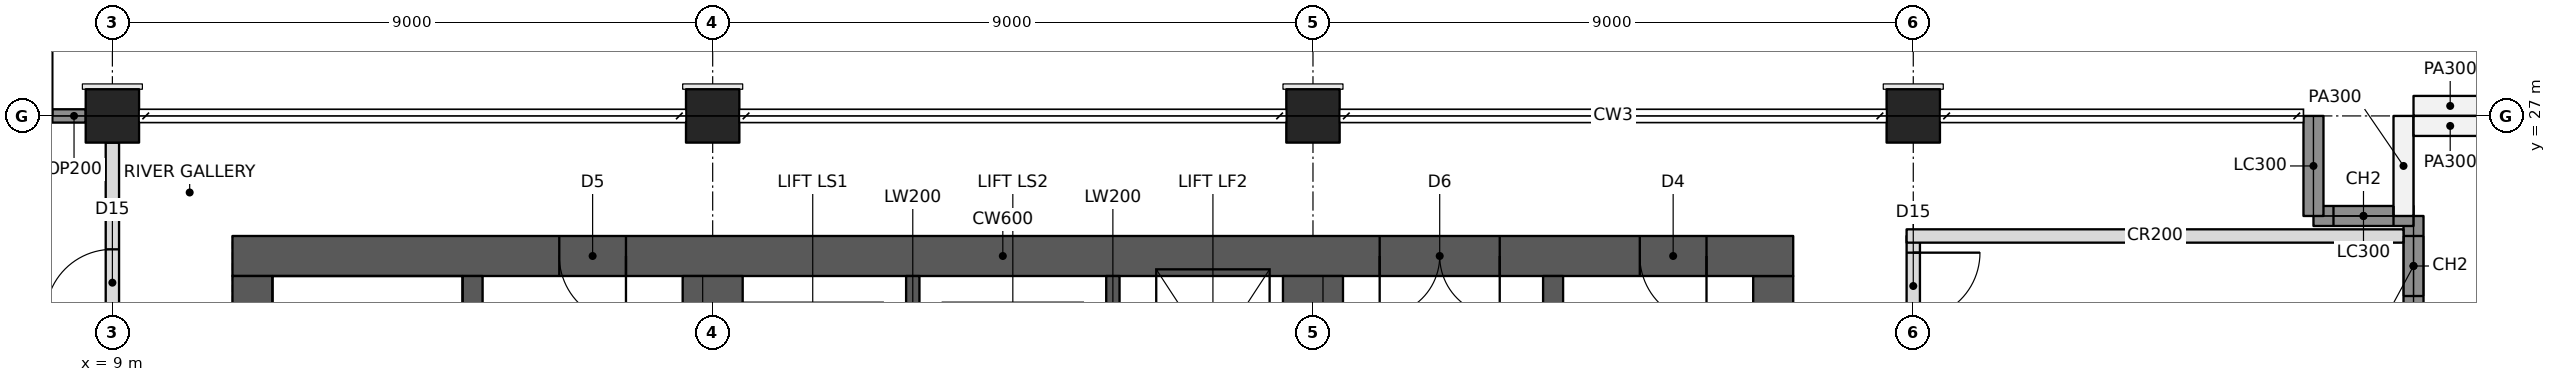
"""IFC4 building model, lengths in metres.
Left out: names, types, materials, properties, quantities, classifications, styles, units other than length and angle.
Written with IfcOpenShell. Run it as: python <this file> out.ifc"""

import sys

from ifc_helpers import new_model, si_unit, direction, frame, frame_2d, origin, origin_2d, place, context, subcontext, project, spatial, rectangle, hollow_rectangle, extrude, element, fill, save


model = new_model("IFC4")
c1 = context("Model", 3, precision=1e-05, world=origin(), true_north=direction((0.0, 1.0)))
c2 = subcontext(c1, "Body", "Model", "MODEL_VIEW")
j1 = project(units=[si_unit("LENGTHUNIT", "METRE"), si_unit("PLANEANGLEUNIT", "RADIAN")], contexts=[c1])
p1 = place(None, origin())
s1 = spatial("IfcSite", under=j1, at=p1, CompositionType="ELEMENT")
p2 = place(p1, origin())
s2 = spatial("IfcBuilding", under=s1, at=p2, CompositionType="ELEMENT")
p3 = place(p2, frame((0.0, 0.0, 160.4)))
s3 = spatial("IfcBuildingStorey", under=s2, at=p3, CompositionType="ELEMENT", Elevation=160.4)
for number, where, z_axis, x_axis in (
    (1, (9.0, 27.0, 0.0), (0.0, 0.0, 1.0), (1.0, 0.0, 0.0)),
    (2, (18.0, 27.0, 0.0), (0.0, 0.0, 1.0), (1.0, 0.0, 0.0)),
    (3, (27.0, 27.0, 0.0), (0.0, 0.0, 1.0), (1.0, 0.0, 0.0)),
    (4, (36.0, 27.0, 0.0), (0.0, 0.0, 1.0), (1.0, 0.0, 0.0)),
):
    element("IfcColumn", number, at=place(p3, frame(where, z_axis=z_axis, x_axis=x_axis)), inside=s3, PredefinedType="COLUMN", context=c2, shape_type="SweptSolid", body=[
        extrude(hollow_rectangle(XDim=0.8, YDim=0.8, WallThickness=0.07, at=origin_2d()), origin(), (0.0, 0.0, 1.0), 3.4),
    ])
p4 = place(p3, frame((10.8, 24.9, 0.0), z_axis=(0.0, 0.0, 1.0), x_axis=(1.0, 0.0, 0.0)))
e5 = element("IfcWall", 5, at=p4, inside=s3, PredefinedType="SHEAR", context=c2, shape_type="SweptSolid", body=[
    extrude(rectangle(XDim=23.4, YDim=0.6, at=frame_2d((11.7, 0.0))), origin(), (0.0, 0.0, 1.0), 3.4),
])
p5 = place(p4, frame((17.2, 0.0, 0.0)))
e6 = element("IfcOpeningElement", 6, at=p5, cuts=e5, PredefinedType="OPENING", context=c2, shape_type="SweptSolid", body=[
    extrude(rectangle(XDim=1.8, YDim=2.1, at=frame_2d((0.9, 1.05))), frame((0.0, 0.31, 0.0), z_axis=(0.0, -1.0, 0.0), x_axis=(1.0, 0.0, 0.0)), (0.0, 0.0, 1.0), 0.62),
])
p6 = place(p4, frame((21.1, 0.0, 0.0)))
e7 = element("IfcOpeningElement", 7, at=p6, cuts=e5, PredefinedType="OPENING", context=c2, shape_type="SweptSolid", body=[
    extrude(rectangle(XDim=1.0, YDim=2.1, at=frame_2d((0.5, 1.05))), frame((0.0, 0.31, 0.0), z_axis=(0.0, -1.0, 0.0), x_axis=(1.0, 0.0, 0.0)), (0.0, 0.0, 1.0), 0.62),
])
p7 = place(p4, frame((4.9, 0.0, 0.0)))
e8 = element("IfcOpeningElement", 8, at=p7, cuts=e5, PredefinedType="OPENING", context=c2, shape_type="SweptSolid", body=[
    extrude(rectangle(XDim=1.0, YDim=2.1, at=frame_2d((0.5, 1.05))), frame((0.0, 0.31, 0.0), z_axis=(0.0, -1.0, 0.0), x_axis=(1.0, 0.0, 0.0)), (0.0, 0.0, 1.0), 0.62),
])
for number, where, z_axis, x_axis in (
    (9, (11.1, 11.4, 0.0), (0.0, 0.0, 1.0), (0.0, 1.0, 0.0)),
    (10, (33.9, 11.4, 0.0), (0.0, 0.0, 1.0), (0.0, 1.0, 0.0)),
):
    element("IfcWall", number, at=place(p3, frame(where, z_axis=z_axis, x_axis=x_axis)), inside=s3, PredefinedType="SHEAR", context=c2, shape_type="SweptSolid", body=[
        extrude(rectangle(XDim=13.2, YDim=0.6, at=frame_2d((6.6, 0.0))), origin(), (0.0, 0.0, 1.0), 3.4),
    ])
p8 = place(p3, frame((14.4, 11.4, 0.0), z_axis=(0.0, 0.0, 1.0), x_axis=(0.0, 1.0, 0.0)))
e11 = element("IfcWall", 11, at=p8, inside=s3, PredefinedType="SHEAR", context=c2, shape_type="SweptSolid", body=[
    extrude(rectangle(XDim=13.2, YDim=0.3, at=frame_2d((6.6, 0.0))), origin(), (0.0, 0.0, 1.0), 3.4),
])
p9 = place(p3, frame((18.0, 11.4, 0.0), z_axis=(0.0, 0.0, 1.0), x_axis=(0.0, 1.0, 0.0)))
e12 = element("IfcWall", 12, at=p9, inside=s3, PredefinedType="SHEAR", context=c2, shape_type="SweptSolid", body=[
    extrude(rectangle(XDim=13.2, YDim=0.9, at=frame_2d((6.6, 0.0))), origin(), (0.0, 0.0, 1.0), 3.4),
])
p10 = place(p9, frame((3.6, 0.0, 0.0)))
e13 = element("IfcOpeningElement", 13, at=p10, cuts=e12, PredefinedType="OPENING", context=c2, shape_type="SweptSolid", body=[
    extrude(rectangle(XDim=1.0, YDim=2.1, at=frame_2d((0.5, 1.05))), frame((0.0, 0.46, 0.0), z_axis=(0.0, -1.0, 0.0), x_axis=(1.0, 0.0, 0.0)), (0.0, 0.0, 1.0), 0.92),
])
p11 = place(p9, frame((7.85, 0.0, 0.0)))
e14 = element("IfcOpeningElement", 14, at=p11, cuts=e12, PredefinedType="OPENING", context=c2, shape_type="SweptSolid", body=[
    extrude(rectangle(XDim=1.1, YDim=2.1, at=frame_2d((0.55, 1.05))), frame((0.0, 0.46, 0.0), z_axis=(0.0, -1.0, 0.0), x_axis=(1.0, 0.0, 0.0)), (0.0, 0.0, 1.0), 0.92),
])
p12 = place(p3, frame((27.0, 21.75, 0.0), z_axis=(0.0, 0.0, 1.0), x_axis=(0.0, 1.0, 0.0)))
e15 = element("IfcWall", 15, at=p12, inside=s3, PredefinedType="SHEAR", context=c2, shape_type="SweptSolid", body=[
    extrude(rectangle(XDim=2.85, YDim=0.9, at=frame_2d((1.425, 0.0))), origin(), (0.0, 0.0, 1.0), 3.4),
])
for number, where, z_axis, x_axis in (
    (16, (21.0, 21.75, 0.0), (0.0, 0.0, 1.0), (0.0, 1.0, 0.0)),
    (17, (24.0, 21.75, 0.0), (0.0, 0.0, 1.0), (0.0, 1.0, 0.0)),
):
    element("IfcWall", number, at=place(p3, frame(where, z_axis=z_axis, x_axis=x_axis)), inside=s3, PredefinedType="SHEAR", context=c2, shape_type="SweptSolid", body=[
        extrude(rectangle(XDim=2.85, YDim=0.2, at=frame_2d((1.425, 0.0))), origin(), (0.0, 0.0, 1.0), 3.4),
    ])
p13 = place(p3, frame((30.6, 11.4, 0.0), z_axis=(0.0, 0.0, 1.0), x_axis=(0.0, 1.0, 0.0)))
e18 = element("IfcWall", 18, at=p13, inside=s3, PredefinedType="SHEAR", context=c2, shape_type="SweptSolid", body=[
    extrude(rectangle(XDim=13.2, YDim=0.3, at=frame_2d((6.6, 0.0))), origin(), (0.0, 0.0, 1.0), 3.4),
])
p14 = place(p3, frame((43.5, 24.0, 0.0), z_axis=(0.0, 0.0, 1.0), x_axis=(0.0, 1.0, 0.0)))
e19 = element("IfcWall", 19, at=p14, inside=s3, PredefinedType="SOLIDWALL", context=c2, shape_type="SweptSolid", body=[
    extrude(rectangle(XDim=1.5, YDim=0.3, at=frame_2d((0.75, 0.0))), origin(), (0.0, 0.0, 1.0), 3.2),
])
p15 = place(p14, frame((0.3, 0.0, 0.6)))
e20 = element("IfcOpeningElement", 20, at=p15, cuts=e19, PredefinedType="OPENING", context=c2, shape_type="SweptSolid", body=[
    extrude(rectangle(XDim=0.9, YDim=2.2, at=frame_2d((0.45, 1.1))), frame((0.0, 0.16, 0.0), z_axis=(0.0, -1.0, 0.0), x_axis=(1.0, 0.0, 0.0)), (0.0, 0.0, 1.0), 0.32),
])
p16 = place(p3, frame((43.5, 25.5, 0.0), z_axis=(0.0, 0.0, 1.0), x_axis=(-1.0, 0.0, 0.0)))
e21 = element("IfcWall", 21, at=p16, inside=s3, PredefinedType="SOLIDWALL", context=c2, shape_type="SweptSolid", body=[
    extrude(rectangle(XDim=1.5, YDim=0.3, at=frame_2d((0.75, 0.0))), origin(), (0.0, 0.0, 1.0), 3.2),
])
p17 = place(p16, frame((0.3, 0.0, 0.6)))
e22 = element("IfcOpeningElement", 22, at=p17, cuts=e21, PredefinedType="OPENING", context=c2, shape_type="SweptSolid", body=[
    extrude(rectangle(XDim=0.9, YDim=2.2, at=frame_2d((0.45, 1.1))), frame((0.0, 0.16, 0.0), z_axis=(0.0, -1.0, 0.0), x_axis=(1.0, 0.0, 0.0)), (0.0, 0.0, 1.0), 0.32),
])
p18 = place(p3, frame((42.0, 25.5, 0.0), z_axis=(0.0, 0.0, 1.0), x_axis=(0.0, 1.0, 0.0)))
e23 = element("IfcWall", 23, at=p18, inside=s3, PredefinedType="SOLIDWALL", context=c2, shape_type="SweptSolid", body=[
    extrude(rectangle(XDim=1.5, YDim=0.3, at=frame_2d((0.75, 0.0))), origin(), (0.0, 0.0, 1.0), 2.42),
])
p19 = place(p3, frame((6.6, 27.0, 0.0), z_axis=(0.0, 0.0, 1.0), x_axis=(1.0, 0.0, 0.0)))
e24 = element("IfcWall", 24, at=p19, inside=s3, PredefinedType="SOLIDWALL", context=c2, shape_type="SweptSolid", body=[
    extrude(rectangle(XDim=2.0, YDim=0.2, at=frame_2d((1.0, 0.0))), origin(), (0.0, 0.0, 1.0), 2.42),
])
p20 = place(p19, frame((0.5, 0.0, 0.0)))
e25 = element("IfcOpeningElement", 25, at=p20, cuts=e24, PredefinedType="OPENING", context=c2, shape_type="SweptSolid", body=[
    extrude(rectangle(XDim=1.0, YDim=2.1, at=frame_2d((0.5, 1.05))), frame((0.0, 0.11, 0.0), z_axis=(0.0, -1.0, 0.0), x_axis=(1.0, 0.0, 0.0)), (0.0, 0.0, 1.0), 0.22),
])
p21 = place(p3, frame((44.6, 27.15, 0.0), z_axis=(0.0, 0.0, 1.0), x_axis=(-1.0, 0.0, 0.0)))
e26 = element("IfcWall", 26, at=p21, inside=s3, PredefinedType="PARAPET", context=c2, shape_type="SweptSolid", body=[
    extrude(rectangle(XDim=1.1, YDim=0.3, at=frame_2d((0.55, 0.0))), origin(), (0.0, 0.0, 1.0), 1.1),
])
p22 = place(p3, frame((43.35, 27.0, 0.0), z_axis=(0.0, 0.0, 1.0), x_axis=(0.0, -1.0, 0.0)))
e27 = element("IfcWall", 27, at=p22, inside=s3, PredefinedType="PARAPET", context=c2, shape_type="SweptSolid", body=[
    extrude(rectangle(XDim=1.5, YDim=0.3, at=frame_2d((0.75, 0.0))), origin(), (0.0, 0.0, 1.0), 1.1),
])
p23 = place(p3, frame((43.5, 26.85, 0.0), z_axis=(0.0, 0.0, 1.0), x_axis=(1.0, 0.0, 0.0)))
e28 = element("IfcWall", 28, at=p23, inside=s3, PredefinedType="PARAPET", context=c2, shape_type="SweptSolid", body=[
    extrude(rectangle(XDim=1.1, YDim=0.3, at=frame_2d((0.55, 0.0))), origin(), (0.0, 0.0, 1.0), 1.1),
])
p24 = place(p3, frame((9.0, 18.5, 0.0), z_axis=(0.0, 0.0, 1.0), x_axis=(0.0, 1.0, 0.0)))
e29 = element("IfcWall", 29, at=p24, inside=s3, PredefinedType="PARTITIONING", context=c2, shape_type="SweptSolid", body=[
    extrude(rectangle(XDim=8.1, YDim=0.2, at=frame_2d((4.05, 0.0))), origin(), (0.0, 0.0, 1.0), 2.405),
])
p25 = place(p24, frame((5.5, 0.0, 0.0)))
e30 = element("IfcOpeningElement", 30, at=p25, cuts=e29, PredefinedType="OPENING", context=c2, shape_type="SweptSolid", body=[
    extrude(rectangle(XDim=1.0, YDim=2.1, at=frame_2d((0.5, 1.05))), frame((0.0, 0.11, 0.0), z_axis=(0.0, -1.0, 0.0), x_axis=(1.0, 0.0, 0.0)), (0.0, 0.0, 1.0), 0.22),
])
p26 = place(p3, frame((36.0, 18.5, 0.0), z_axis=(0.0, 0.0, 1.0), x_axis=(0.0, 1.0, 0.0)))
e31 = element("IfcWall", 31, at=p26, inside=s3, PredefinedType="PARTITIONING", context=c2, shape_type="SweptSolid", body=[
    extrude(rectangle(XDim=6.7, YDim=0.2, at=frame_2d((3.35, 0.0))), origin(), (0.0, 0.0, 1.0), 2.405),
])
p27 = place(p26, frame((5.45, 0.0, 0.0)))
e32 = element("IfcOpeningElement", 32, at=p27, cuts=e31, PredefinedType="OPENING", context=c2, shape_type="SweptSolid", body=[
    extrude(rectangle(XDim=1.0, YDim=2.1, at=frame_2d((0.5, 1.05))), frame((0.0, 0.11, 0.0), z_axis=(0.0, -1.0, 0.0), x_axis=(1.0, 0.0, 0.0)), (0.0, 0.0, 1.0), 0.22),
])
p28 = place(p3, frame((35.9, 25.2, 0.0), z_axis=(0.0, 0.0, 1.0), x_axis=(1.0, 0.0, 0.0)))
e33 = element("IfcWall", 33, at=p28, inside=s3, PredefinedType="PARTITIONING", context=c2, shape_type="SweptSolid", body=[
    extrude(rectangle(XDim=7.45, YDim=0.2, at=frame_2d((3.725, 0.0))), origin(), (0.0, 0.0, 1.0), 2.404),
])
p29 = place(p15, origin())
e34 = element("IfcWindow", 34, at=p29, inside=s3, PartitioningType="SINGLE_PANEL", PredefinedType="WINDOW", context=c2, shape_type="SweptSolid", body=[
    extrude(rectangle(XDim=0.9, YDim=2.2, at=frame_2d((0.45, 1.1))), frame((0.0, 0.03, 0.0), z_axis=(0.0, -1.0, 0.0), x_axis=(1.0, 0.0, 0.0)), (0.0, 0.0, 1.0), 0.06),
])
fill(e20, e34)
p30 = place(p17, origin())
e35 = element("IfcWindow", 35, at=p30, inside=s3, PartitioningType="SINGLE_PANEL", PredefinedType="WINDOW", context=c2, shape_type="SweptSolid", body=[
    extrude(rectangle(XDim=0.9, YDim=2.2, at=frame_2d((0.45, 1.1))), frame((0.0, 0.03, 0.0), z_axis=(0.0, -1.0, 0.0), x_axis=(1.0, 0.0, 0.0)), (0.0, 0.0, 1.0), 0.06),
])
fill(e22, e35)
p31 = place(p27, frame((1.0, 0.0, 0.0), z_axis=(0.0, 0.0, 1.0), x_axis=(-1.0, 0.0, 0.0)))
e36 = element("IfcDoor", 36, at=p31, inside=s3, OperationType="SINGLE_SWING_LEFT", PredefinedType="DOOR", context=c2, shape_type="SweptSolid", body=[
    extrude(rectangle(XDim=1.0, YDim=2.1, at=frame_2d((0.5, 1.05))), frame((0.0, 0.025, 0.0), z_axis=(0.0, -1.0, 0.0), x_axis=(1.0, 0.0, 0.0)), (0.0, 0.0, 1.0), 0.05),
])
fill(e32, e36)
p32 = place(p25, origin())
e37 = element("IfcDoor", 37, at=p32, inside=s3, OperationType="SINGLE_SWING_LEFT", PredefinedType="DOOR", context=c2, shape_type="SweptSolid", body=[
    extrude(rectangle(XDim=1.0, YDim=2.1, at=frame_2d((0.5, 1.05))), frame((0.0, 0.025, 0.0), z_axis=(0.0, -1.0, 0.0), x_axis=(1.0, 0.0, 0.0)), (0.0, 0.0, 1.0), 0.05),
])
fill(e30, e37)
p33 = place(p5, frame((1.8, 0.0, 0.0), z_axis=(0.0, 0.0, 1.0), x_axis=(-1.0, 0.0, 0.0)))
e38 = element("IfcDoor", 38, at=p33, inside=s3, OperationType="DOUBLE_DOOR_SINGLE_SWING", PredefinedType="DOOR", context=c2, shape_type="SweptSolid", body=[
    extrude(rectangle(XDim=1.8, YDim=2.1, at=frame_2d((0.9, 1.05))), frame((0.0, 0.025, 0.0), z_axis=(0.0, -1.0, 0.0), x_axis=(1.0, 0.0, 0.0)), (0.0, 0.0, 1.0), 0.05),
])
fill(e6, e38)
p34 = place(p6, frame((1.0, 0.0, 0.0), z_axis=(0.0, 0.0, 1.0), x_axis=(-1.0, 0.0, 0.0)))
e39 = element("IfcDoor", 39, at=p34, inside=s3, OperationType="SINGLE_SWING_LEFT", PredefinedType="DOOR", context=c2, shape_type="SweptSolid", body=[
    extrude(rectangle(XDim=1.0, YDim=2.1, at=frame_2d((0.5, 1.05))), frame((0.0, 0.025, 0.0), z_axis=(0.0, -1.0, 0.0), x_axis=(1.0, 0.0, 0.0)), (0.0, 0.0, 1.0), 0.05),
])
fill(e7, e39)
p35 = place(p7, frame((1.0, 0.0, 0.0), z_axis=(0.0, 0.0, 1.0), x_axis=(-1.0, 0.0, 0.0)))
e40 = element("IfcDoor", 40, at=p35, inside=s3, OperationType="SINGLE_SWING_LEFT", PredefinedType="DOOR", context=c2, shape_type="SweptSolid", body=[
    extrude(rectangle(XDim=1.0, YDim=2.1, at=frame_2d((0.5, 1.05))), frame((0.0, 0.025, 0.0), z_axis=(0.0, -1.0, 0.0), x_axis=(1.0, 0.0, 0.0)), (0.0, 0.0, 1.0), 0.05),
])
fill(e8, e40)
save(model, sys.argv[1])
